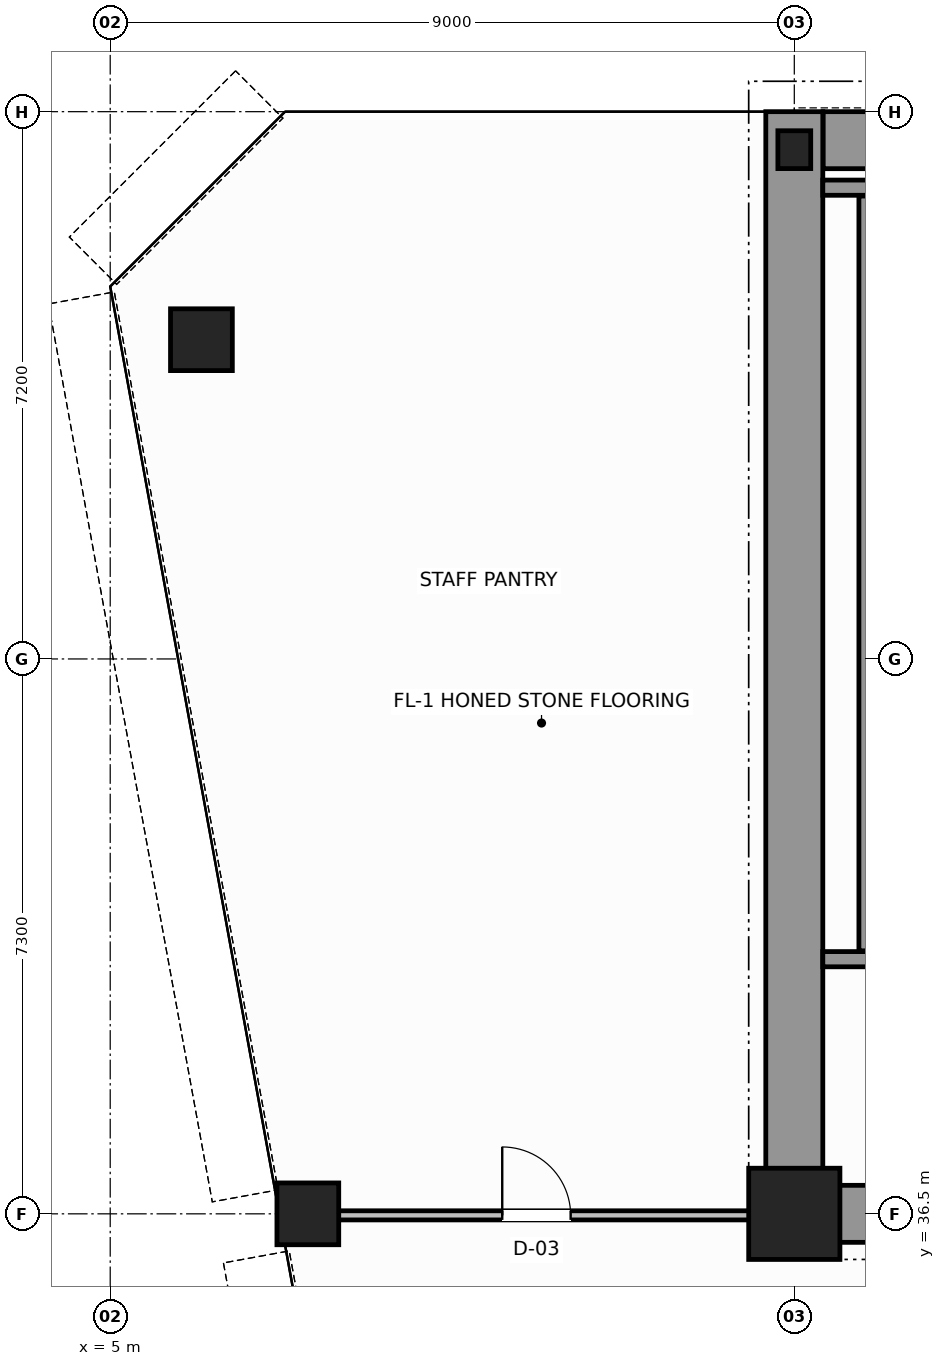
"""IFC4 building model, lengths in metres.
Left out: names, types, materials, properties, quantities, classifications, styles, units other than length and angle.
Written with IfcOpenShell. Run it as: python <this file> out.ifc"""

import sys

from ifc_helpers import new_model, si_unit, direction, frame, frame_2d, origin, origin_2d, place, context, subcontext, project, spatial, rectangle, hollow_circle, i_section, extrude, source, transform, mapped, element, fill, save


model = new_model("IFC4")
c1 = context("Model", 3, precision=1e-05, world=origin(), true_north=direction((0.0, 1.0)))
c2 = subcontext(c1, "Body", "Model", "MODEL_VIEW")
j1 = project(units=[si_unit("LENGTHUNIT", "METRE"), si_unit("PLANEANGLEUNIT", "RADIAN")], contexts=[c1])
p1 = place(None, origin())
s1 = spatial("IfcSite", under=j1, at=p1, CompositionType="ELEMENT")
p2 = place(p1, origin())
s2 = spatial("IfcBuilding", under=s1, at=p2, CompositionType="ELEMENT")
p3 = place(p2, frame((0.0, 0.0, 165.2)))
s3 = spatial("IfcBuildingStorey", under=s2, at=p3, CompositionType="ELEMENT", Elevation=165.2)
m1 = source(origin(), c2, "Body", "SweptSolid", [
    extrude(rectangle(XDim=1.2, YDim=1.2, at=origin_2d()), origin(), (0.0, 0.0, 1.0), 3.8),
])
p4 = place(p3, frame((14.0, 36.5, 0.0), z_axis=(0.0, 0.0, 1.0), x_axis=(1.0, 0.0, 0.0)))
e1 = element("IfcColumn", 1, at=p4, inside=s3, PredefinedType="COLUMN", context=c2, shape_type="MappedRepresentation", body=[
    mapped(m1, transform((0.0, 0.0, 0.0), scale=1.0)),
])
m2 = source(origin(), c2, "Body", "SweptSolid", [
    extrude(i_section(OverallWidth=0.432, OverallDepth=0.498, WebThickness=0.055, FlangeThickness=0.068, FilletRadius=0.015, at=origin_2d()), origin(), (0.0, 0.0, 1.0), 3.8),
])
p5 = place(p3, frame((14.0, 50.5, 0.0), z_axis=(0.0, 0.0, 1.0), x_axis=(1.0, 0.0, 0.0)))
e2 = element("IfcColumn", 2, at=p5, inside=s3, PredefinedType="COLUMN", context=c2, shape_type="MappedRepresentation", body=[
    mapped(m2, transform((0.0, 0.0, 0.0), scale=1.0)),
])
m3 = source(origin(), c2, "Body", "SweptSolid", [
    extrude(hollow_circle(Radius=0.406, WallThickness=0.04, at=origin_2d()), origin(), (0.0, 0.0, 1.0), 3.8),
])
for number, where, z_axis, x_axis in (
    (3, (6.2, 48.0, 0.0), (0.0, 0.0, 1.0), (1.0, 0.0, 0.0)),
    (4, (7.6, 36.5, 0.0), (0.0, 0.0, 1.0), (1.0, 0.0, 0.0)),
):
    element("IfcColumn", number, at=place(p3, frame(where, z_axis=z_axis, x_axis=x_axis)), inside=s3, PredefinedType="COLUMN", context=c2, shape_type="MappedRepresentation", body=[
        mapped(m3, transform((0.0, 0.0, 0.0), scale=1.0)),
    ])
p6 = place(p3, frame((14.379, 50.625, 0.0), z_axis=(0.0, 0.0, 1.0), x_axis=(1.0, 0.0, 0.0)))
e5 = element("IfcWall", 5, at=p6, inside=s3, PredefinedType="SHEAR", context=c2, shape_type="SweptSolid", body=[
    extrude(rectangle(XDim=19.619, YDim=0.75, at=frame_2d((9.81, 0.0))), origin(), (0.0, 0.0, 1.0), 3.8),
])
p7 = place(p3, frame((14.0, 36.5, 0.0), z_axis=(0.0, 0.0, 1.0), x_axis=(0.0, 1.0, 0.0)))
e6 = element("IfcWall", 6, at=p7, inside=s3, PredefinedType="SHEAR", context=c2, shape_type="SweptSolid", body=[
    extrude(rectangle(XDim=14.5, YDim=0.75, at=frame_2d((7.25, 0.0))), origin(), (0.0, 0.0, 1.0), 3.8),
])
p8 = place(p3, frame((14.395, 36.5, 0.0), z_axis=(0.0, 0.0, 1.0), x_axis=(1.0, 0.0, 0.0)))
e7 = element("IfcWall", 7, at=p8, inside=s3, PredefinedType="SHEAR", context=c2, shape_type="SweptSolid", body=[
    extrude(rectangle(XDim=3.805, YDim=0.75, at=frame_2d((1.902, 0.0))), origin(), (0.0, 0.0, 1.0), 2.38),
])
p9 = place(p3, frame((14.375, 39.85, 0.0), z_axis=(0.0, 0.0, 1.0), x_axis=(1.0, 0.0, 0.0)))
e8 = element("IfcWall", 8, at=p9, inside=s3, PredefinedType="SOLIDWALL", context=c2, shape_type="SweptSolid", body=[
    extrude(rectangle(XDim=4.225, YDim=0.2, at=frame_2d((2.113, 0.0))), origin(), (0.0, 0.0, 1.0), 3.8),
])
p10 = place(p9, frame((1.8, 0.0, 0.0)))
e9 = element("IfcOpeningElement", 9, at=p10, cuts=e8, PredefinedType="OPENING", context=c2, shape_type="SweptSolid", body=[
    extrude(rectangle(XDim=1.1, YDim=2.15, at=frame_2d((0.55, 1.075))), frame((0.0, 0.11, 0.0), z_axis=(0.0, -1.0, 0.0), x_axis=(1.0, 0.0, 0.0)), (0.0, 0.0, 1.0), 0.22),
])
p11 = place(p3, frame((14.375, 50.0, 0.0), z_axis=(0.0, 0.0, 1.0), x_axis=(1.0, 0.0, 0.0)))
e10 = element("IfcWall", 10, at=p11, inside=s3, PredefinedType="SOLIDWALL", context=c2, shape_type="SweptSolid", body=[
    extrude(rectangle(XDim=4.225, YDim=0.2, at=frame_2d((2.113, 0.0))), origin(), (0.0, 0.0, 1.0), 3.8),
])
p12 = place(p3, frame((14.95, 39.96, 0.0), z_axis=(0.0, 0.0, 1.0), x_axis=(0.0, 1.0, 0.0)))
e11 = element("IfcWall", 11, at=p12, inside=s3, PredefinedType="SOLIDWALL", context=c2, shape_type="SweptSolid", body=[
    extrude(rectangle(XDim=9.93, YDim=0.2, at=frame_2d((4.965, 0.0))), origin(), (0.0, 0.0, 1.0), 3.8),
])
p13 = place(p3, frame((7.274, 36.48, 0.0), z_axis=(0.0, 0.0, 1.0), x_axis=(1.0, 0.0, 0.0)))
e12 = element("IfcWall", 12, at=p13, inside=s3, PredefinedType="PARTITIONING", context=c2, shape_type="SweptSolid", body=[
    extrude(rectangle(XDim=6.666, YDim=0.12, at=frame_2d((3.333, 0.0))), origin(), (0.0, 0.0, 1.0), 2.97),
])
p14 = place(p13, frame((2.883, 0.0, 0.0)))
e13 = element("IfcOpeningElement", 13, at=p14, cuts=e12, PredefinedType="OPENING", context=c2, shape_type="SweptSolid", body=[
    extrude(rectangle(XDim=0.9, YDim=2.15, at=frame_2d((0.45, 1.075))), frame((0.0, 0.07, 0.0), z_axis=(0.0, -1.0, 0.0), x_axis=(1.0, 0.0, 0.0)), (0.0, 0.0, 1.0), 0.14),
])
m4 = source(origin(), c2, "Body", "SweptSolid", [
    extrude(rectangle(XDim=0.9, YDim=2.15, at=frame_2d((0.45, 1.075))), frame((0.0, 0.025, 0.0), z_axis=(0.0, -1.0, 0.0), x_axis=(1.0, 0.0, 0.0)), (0.0, 0.0, 1.0), 0.05),
])
p15 = place(p14, origin())
e14 = element("IfcDoor", 14, at=p15, inside=s3, OperationType="SINGLE_SWING_LEFT", PredefinedType="DOOR", context=c2, shape_type="MappedRepresentation", body=[
    mapped(m4, transform((0.0, 0.0, 0.0), scale=1.0)),
])
fill(e13, e14)
save(model, sys.argv[1])
